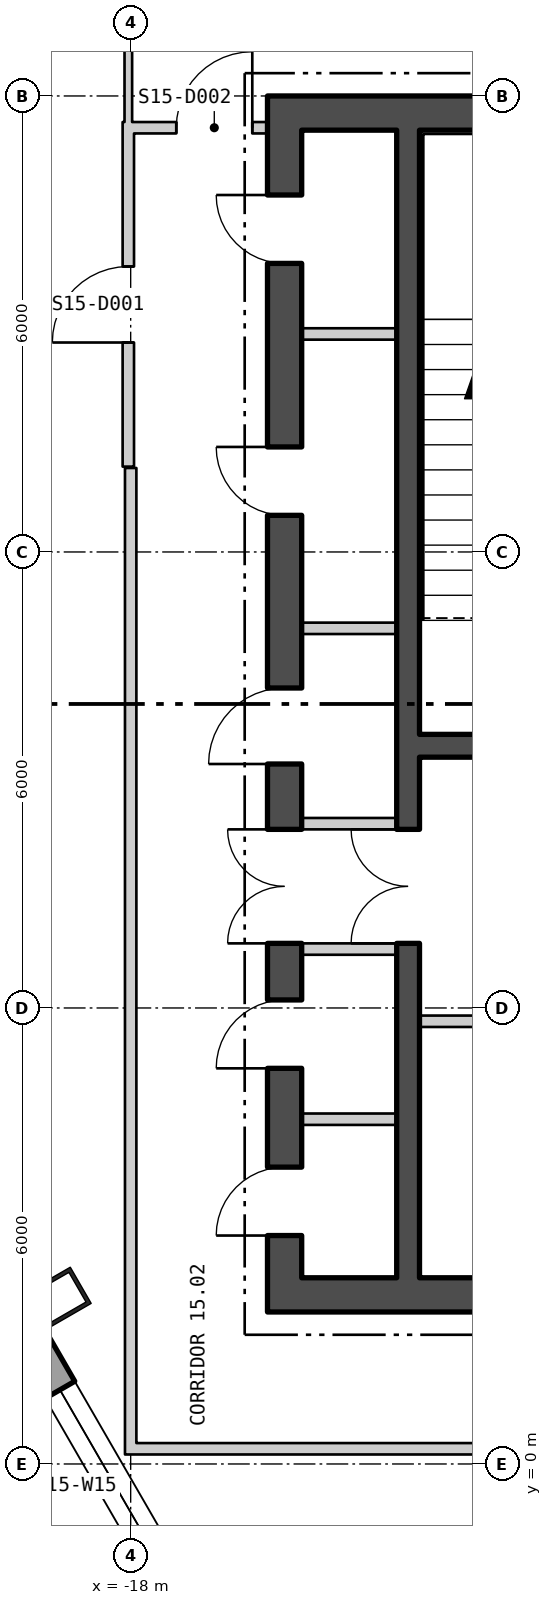
"""IFC4 building model, lengths in metres.
Left out: names, types, materials, properties, quantities, classifications, styles, units other than length and angle.
Written with IfcOpenShell. Run it as: python <this file> out.ifc"""

import sys

from ifc_helpers import new_model, si_unit, direction, frame, frame_2d, origin, origin_2d, place, context, subcontext, project, spatial, polyline, rectangle, hollow_rectangle, outline, extrude, element, fill, save


model = new_model("IFC4")
c1 = context("Model", 3, precision=1e-05, world=origin(), true_north=direction((0.0, 1.0)))
c2 = subcontext(c1, "Body", "Model", "MODEL_VIEW")
j1 = project(units=[si_unit("LENGTHUNIT", "METRE"), si_unit("PLANEANGLEUNIT", "RADIAN")], contexts=[c1])
p1 = place(None, origin())
s1 = spatial("IfcSite", under=j1, at=p1, CompositionType="ELEMENT")
p2 = place(p1, origin())
s2 = spatial("IfcBuilding", under=s1, at=p2, CompositionType="ELEMENT")
p3 = place(p2, frame((0.0, 0.0, 204.3)))
s3 = spatial("IfcBuildingStorey", under=s2, at=p3, CompositionType="ELEMENT", Elevation=204.3)
p4 = place(p3, frame((-18.96, 2.176, 0.0), z_axis=(0.0, 0.0, 1.0), x_axis=(0.5, -0.866025403784, 0.0)))
e1 = element("IfcColumn", 1, at=p4, inside=s3, PredefinedType="COLUMN", context=c2, shape_type="SweptSolid", body=[
    extrude(hollow_rectangle(XDim=0.55, YDim=0.7, WallThickness=0.05, at=origin_2d()), origin(), (0.0, 0.0, 1.0), 3.9),
])
p5 = place(p3, frame((-26.385, 13.887, -0.18), z_axis=(0.0, 0.0, 1.0), x_axis=(0.499999764979, -0.866025539474, 0.0)))
e2 = element("IfcWall", 2, at=p5, inside=s3, PredefinedType="SOLIDWALL", context=c2, shape_type="SweptSolid", body=[
    extrude(outline(polyline([(-0.13, -0.225), (45.87, -0.225), (45.61, 0.225), (0.13, 0.225), (-0.13, -0.225)])), origin(), (0.0, 0.0, 1.0), 3.68),
])
p6 = place(p5, frame((1.424, 0.0, 1.08)))
e3 = element("IfcOpeningElement", 3, at=p6, cuts=e2, PredefinedType="OPENING", context=c2, shape_type="SweptSolid", body=[
    extrude(rectangle(XDim=2.4, YDim=2.0, at=frame_2d((1.2, 1.0))), frame((0.0, 0.235, 0.0), z_axis=(0.0, -1.0, 0.0), x_axis=(1.0, 0.0, 0.0)), (0.0, 0.0, 1.0), 0.47),
])
p7 = place(p5, frame((5.893, 0.0, 1.08)))
e4 = element("IfcOpeningElement", 4, at=p7, cuts=e2, PredefinedType="OPENING", context=c2, shape_type="SweptSolid", body=[
    extrude(rectangle(XDim=2.4, YDim=2.0, at=frame_2d((1.2, 1.0))), frame((0.0, 0.235, 0.0), z_axis=(0.0, -1.0, 0.0), x_axis=(1.0, 0.0, 0.0)), (0.0, 0.0, 1.0), 0.47),
])
p8 = place(p5, frame((10.401, 0.0, 1.08)))
e5 = element("IfcOpeningElement", 5, at=p8, cuts=e2, PredefinedType="OPENING", context=c2, shape_type="SweptSolid", body=[
    extrude(rectangle(XDim=2.4, YDim=2.0, at=frame_2d((1.2, 1.0))), frame((0.0, 0.235, 0.0), z_axis=(0.0, -1.0, 0.0), x_axis=(1.0, 0.0, 0.0)), (0.0, 0.0, 1.0), 0.47),
])
p9 = place(p5, frame((14.909, 0.0, 1.08)))
e6 = element("IfcOpeningElement", 6, at=p9, cuts=e2, PredefinedType="OPENING", context=c2, shape_type="SweptSolid", body=[
    extrude(rectangle(XDim=2.4, YDim=2.0, at=frame_2d((1.2, 1.0))), frame((0.0, 0.235, 0.0), z_axis=(0.0, -1.0, 0.0), x_axis=(1.0, 0.0, 0.0)), (0.0, 0.0, 1.0), 0.47),
])
p10 = place(p5, frame((19.416, 0.0, 1.08)))
e7 = element("IfcOpeningElement", 7, at=p10, cuts=e2, PredefinedType="OPENING", context=c2, shape_type="SweptSolid", body=[
    extrude(rectangle(XDim=2.4, YDim=2.0, at=frame_2d((1.2, 1.0))), frame((0.0, 0.235, 0.0), z_axis=(0.0, -1.0, 0.0), x_axis=(1.0, 0.0, 0.0)), (0.0, 0.0, 1.0), 0.47),
])
p11 = place(p5, frame((23.924, 0.0, 1.08)))
e8 = element("IfcOpeningElement", 8, at=p11, cuts=e2, PredefinedType="OPENING", context=c2, shape_type="SweptSolid", body=[
    extrude(rectangle(XDim=2.4, YDim=2.0, at=frame_2d((1.2, 1.0))), frame((0.0, 0.235, 0.0), z_axis=(0.0, -1.0, 0.0), x_axis=(1.0, 0.0, 0.0)), (0.0, 0.0, 1.0), 0.47),
])
p12 = place(p5, frame((28.431, 0.0, 1.08)))
e9 = element("IfcOpeningElement", 9, at=p12, cuts=e2, PredefinedType="OPENING", context=c2, shape_type="SweptSolid", body=[
    extrude(rectangle(XDim=2.4, YDim=2.0, at=frame_2d((1.2, 1.0))), frame((0.0, 0.235, 0.0), z_axis=(0.0, -1.0, 0.0), x_axis=(1.0, 0.0, 0.0)), (0.0, 0.0, 1.0), 0.47),
])
p13 = place(p5, frame((32.939, 0.0, 1.08)))
e10 = element("IfcOpeningElement", 10, at=p13, cuts=e2, PredefinedType="OPENING", context=c2, shape_type="SweptSolid", body=[
    extrude(rectangle(XDim=2.4, YDim=2.0, at=frame_2d((1.2, 1.0))), frame((0.0, 0.235, 0.0), z_axis=(0.0, -1.0, 0.0), x_axis=(1.0, 0.0, 0.0)), (0.0, 0.0, 1.0), 0.47),
])
p14 = place(p5, frame((41.916, 0.0, 1.08)))
e11 = element("IfcOpeningElement", 11, at=p14, cuts=e2, PredefinedType="OPENING", context=c2, shape_type="SweptSolid", body=[
    extrude(rectangle(XDim=2.4, YDim=2.0, at=frame_2d((1.2, 1.0))), frame((0.0, 0.235, 0.0), z_axis=(0.0, -1.0, 0.0), x_axis=(1.0, 0.0, 0.0)), (0.0, 0.0, 1.0), 0.47),
])
p15 = place(p3, frame((-16.2, 2.225, 0.0), z_axis=(0.0, 0.0, 1.0), x_axis=(1.0, 0.0, 0.0)))
e12 = element("IfcWall", 12, at=p15, inside=s3, PredefinedType="SHEAR", context=c2, shape_type="SweptSolid", body=[
    extrude(rectangle(XDim=32.4, YDim=0.45, at=frame_2d((16.2, 0.0))), origin(), (0.0, 0.0, 1.0), 3.7),
])
p16 = place(p15, frame((10.7, 0.0, 0.0)))
e13 = element("IfcOpeningElement", 13, at=p16, cuts=e12, PredefinedType="OPENING", context=c2, shape_type="SweptSolid", body=[
    extrude(rectangle(XDim=1.8, YDim=2.4, at=frame_2d((0.9, 1.2))), frame((0.0, 0.235, 0.0), z_axis=(0.0, -1.0, 0.0), x_axis=(1.0, 0.0, 0.0)), (0.0, 0.0, 1.0), 0.47),
])
p17 = place(p15, frame((20.7, 0.0, 0.0)))
e14 = element("IfcOpeningElement", 14, at=p17, cuts=e12, PredefinedType="OPENING", context=c2, shape_type="SweptSolid", body=[
    extrude(rectangle(XDim=1.8, YDim=2.4, at=frame_2d((0.9, 1.2))), frame((0.0, 0.235, 0.0), z_axis=(0.0, -1.0, 0.0), x_axis=(1.0, 0.0, 0.0)), (0.0, 0.0, 1.0), 0.47),
])
p18 = place(p3, frame((-16.2, 17.775, 0.0), z_axis=(0.0, 0.0, 1.0), x_axis=(1.0, 0.0, 0.0)))
e15 = element("IfcWall", 15, at=p18, inside=s3, PredefinedType="SHEAR", context=c2, shape_type="SweptSolid", body=[
    extrude(rectangle(XDim=32.4, YDim=0.45, at=frame_2d((16.2, 0.0))), origin(), (0.0, 0.0, 1.0), 3.7),
])
p19 = place(p3, frame((-15.975, 2.45, 0.0), z_axis=(0.0, 0.0, 1.0), x_axis=(0.0, 1.0, 0.0)))
e16 = element("IfcWall", 16, at=p19, inside=s3, PredefinedType="SHEAR", context=c2, shape_type="SweptSolid", body=[
    extrude(rectangle(XDim=15.1, YDim=0.45, at=frame_2d((7.55, 0.0))), origin(), (0.0, 0.0, 1.0), 3.7),
])
p20 = place(p19, frame((4.4, 0.0, 0.0)))
e17 = element("IfcOpeningElement", 17, at=p20, cuts=e16, PredefinedType="OPENING", context=c2, shape_type="SweptSolid", body=[
    extrude(rectangle(XDim=1.5, YDim=2.1, at=frame_2d((0.75, 1.05))), frame((0.0, 0.235, 0.0), z_axis=(0.0, -1.0, 0.0), x_axis=(1.0, 0.0, 0.0)), (0.0, 0.0, 1.0), 0.47),
])
p21 = place(p19, frame((0.556, 0.0, 0.0)))
e18 = element("IfcOpeningElement", 18, at=p21, cuts=e16, PredefinedType="OPENING", context=c2, shape_type="SweptSolid", body=[
    extrude(rectangle(XDim=0.9, YDim=2.1, at=frame_2d((0.45, 1.05))), frame((0.0, 0.235, 0.0), z_axis=(0.0, -1.0, 0.0), x_axis=(1.0, 0.0, 0.0)), (0.0, 0.0, 1.0), 0.47),
])
p22 = place(p19, frame((2.756, 0.0, 0.0)))
e19 = element("IfcOpeningElement", 19, at=p22, cuts=e16, PredefinedType="OPENING", context=c2, shape_type="SweptSolid", body=[
    extrude(rectangle(XDim=0.9, YDim=2.1, at=frame_2d((0.45, 1.05))), frame((0.0, 0.235, 0.0), z_axis=(0.0, -1.0, 0.0), x_axis=(1.0, 0.0, 0.0)), (0.0, 0.0, 1.0), 0.47),
])
p23 = place(p19, frame((6.76, 0.0, 0.0)))
e20 = element("IfcOpeningElement", 20, at=p23, cuts=e16, PredefinedType="OPENING", context=c2, shape_type="SweptSolid", body=[
    extrude(rectangle(XDim=1.0, YDim=2.1, at=frame_2d((0.5, 1.05))), frame((0.0, 0.235, 0.0), z_axis=(0.0, -1.0, 0.0), x_axis=(1.0, 0.0, 0.0)), (0.0, 0.0, 1.0), 0.47),
])
p24 = place(p19, frame((10.032, 0.0, 0.0)))
e21 = element("IfcOpeningElement", 21, at=p24, cuts=e16, PredefinedType="OPENING", context=c2, shape_type="SweptSolid", body=[
    extrude(rectangle(XDim=0.9, YDim=2.1, at=frame_2d((0.45, 1.05))), frame((0.0, 0.235, 0.0), z_axis=(0.0, -1.0, 0.0), x_axis=(1.0, 0.0, 0.0)), (0.0, 0.0, 1.0), 0.47),
])
p25 = place(p19, frame((13.347, 0.0, 0.0)))
e22 = element("IfcOpeningElement", 22, at=p25, cuts=e16, PredefinedType="OPENING", context=c2, shape_type="SweptSolid", body=[
    extrude(rectangle(XDim=0.9, YDim=2.1, at=frame_2d((0.45, 1.05))), frame((0.0, 0.235, 0.0), z_axis=(0.0, -1.0, 0.0), x_axis=(1.0, 0.0, 0.0)), (0.0, 0.0, 1.0), 0.47),
])
p26 = place(p3, frame((-14.35, 2.45, 0.0), z_axis=(0.0, 0.0, 1.0), x_axis=(0.0, 1.0, 0.0)))
e23 = element("IfcWall", 23, at=p26, inside=s3, PredefinedType="SHEAR", context=c2, shape_type="SweptSolid", body=[
    extrude(rectangle(XDim=15.1, YDim=0.3, at=frame_2d((7.55, 0.0))), origin(), (0.0, 0.0, 1.0), 3.7),
])
p27 = place(p26, frame((4.4, 0.0, 0.0)))
e24 = element("IfcOpeningElement", 24, at=p27, cuts=e23, PredefinedType="OPENING", context=c2, shape_type="SweptSolid", body=[
    extrude(rectangle(XDim=1.5, YDim=2.1, at=frame_2d((0.75, 1.05))), frame((0.0, 0.16, 0.0), z_axis=(0.0, -1.0, 0.0), x_axis=(1.0, 0.0, 0.0)), (0.0, 0.0, 1.0), 0.32),
])
p28 = place(p3, frame((-14.2, 9.45, 0.0), z_axis=(0.0, 0.0, 1.0), x_axis=(1.0, 0.0, 0.0)))
e25 = element("IfcWall", 25, at=p28, inside=s3, PredefinedType="SHEAR", context=c2, shape_type="SweptSolid", body=[
    extrude(rectangle(XDim=3.2, YDim=0.3, at=frame_2d((1.6, 0.0))), origin(), (0.0, 0.0, 1.0), 3.7),
])
p29 = place(p28, frame((1.0, 0.0, 0.0)))
e26 = element("IfcOpeningElement", 26, at=p29, cuts=e25, PredefinedType="OPENING", context=c2, shape_type="SweptSolid", body=[
    extrude(rectangle(XDim=1.2, YDim=2.1, at=frame_2d((0.6, 1.05))), frame((0.0, 0.16, 0.0), z_axis=(0.0, -1.0, 0.0), x_axis=(1.0, 0.0, 0.0)), (0.0, 0.0, 1.0), 0.32),
])
p30 = place(p3, frame((-14.2, 5.825, 0.0), z_axis=(0.0, 0.0, 1.0), x_axis=(1.0, 0.0, 0.0)))
e27 = element("IfcWall", 27, at=p30, inside=s3, PredefinedType="PARTITIONING", context=c2, shape_type="SweptSolid", body=[
    extrude(rectangle(XDim=3.2, YDim=0.15, at=frame_2d((1.6, 0.0))), origin(), (0.0, 0.0, 1.0), 3.7),
])
for number, where, z_axis, x_axis in (
    (28, (-15.75, 6.775, 0.0), (0.0, 0.0, 1.0), (1.0, 0.0, 0.0)),
    (29, (-15.75, 8.425, 0.0), (0.0, 0.0, 1.0), (1.0, 0.0, 0.0)),
    (30, (-15.75, 4.536, 0.0), (0.0, 0.0, 1.0), (1.0, 0.0, 0.0)),
    (31, (-15.75, 10.995, 0.0), (0.0, 0.0, 1.0), (1.0, 0.0, 0.0)),
    (32, (-15.75, 14.869, 0.0), (0.0, 0.0, 1.0), (1.0, 0.0, 0.0)),
):
    element("IfcWall", number, at=place(p3, frame(where, z_axis=z_axis, x_axis=x_axis)), inside=s3, PredefinedType="PARTITIONING", context=c2, shape_type="SweptSolid", body=[
        extrude(rectangle(XDim=1.25, YDim=0.15, at=frame_2d((0.625, 0.0))), origin(), (0.0, 0.0, 1.0), 3.7),
    ])
p31 = place(p3, frame((-18.031, 13.123, 0.0), z_axis=(0.0, 0.0, 1.0), x_axis=(0.0, 1.0, 0.0)))
e33 = element("IfcWall", 33, at=p31, inside=s3, PredefinedType="PARTITIONING", context=c2, shape_type="SweptSolid", body=[
    extrude(rectangle(XDim=4.534, YDim=0.15, at=frame_2d((2.267, 0.0))), origin(), (0.0, 0.0, 1.0), 3.7),
])
p32 = place(p31, frame((1.633, 0.0, 0.0)))
e34 = element("IfcOpeningElement", 34, at=p32, cuts=e33, PredefinedType="OPENING", context=c2, shape_type="SweptSolid", body=[
    extrude(rectangle(XDim=1.0, YDim=2.1, at=frame_2d((0.5, 1.05))), frame((0.0, 0.085, 0.0), z_axis=(0.0, -1.0, 0.0), x_axis=(1.0, 0.0, 0.0)), (0.0, 0.0, 1.0), 0.17),
])
p33 = place(p3, frame((-18.031, 17.657, 0.0), z_axis=(0.0, 0.0, 1.0), x_axis=(0.0, 1.0, 0.0)))
e35 = element("IfcWall", 35, at=p33, inside=s3, PredefinedType="PARTITIONING", context=c2, shape_type="SweptSolid", body=[
    extrude(rectangle(XDim=1.643, YDim=0.1, at=frame_2d((0.822, 0.0))), origin(), (0.0, 0.0, 1.0), 3.7),
])
p34 = place(p3, frame((-18.0, 0.125, 0.0), z_axis=(0.0, 0.0, 1.0), x_axis=(0.0, 1.0, 0.0)))
e36 = element("IfcWall", 36, at=p34, inside=s3, PredefinedType="PARTITIONING", context=c2, shape_type="SweptSolid", body=[
    extrude(rectangle(XDim=12.98, YDim=0.15, at=frame_2d((6.49, 0.0))), origin(), (0.0, 0.0, 1.0), 3.7),
])
p35 = place(p3, frame((-17.956, 17.582, 0.0), z_axis=(0.0, 0.0, 1.0), x_axis=(1.0, 0.0, 0.0)))
e37 = element("IfcWall", 37, at=p35, inside=s3, PredefinedType="PARTITIONING", context=c2, shape_type="SweptSolid", body=[
    extrude(rectangle(XDim=1.756, YDim=0.15, at=frame_2d((0.878, 0.0))), origin(), (0.0, 0.0, 1.0), 3.7),
])
p36 = place(p35, frame((0.556, 0.0, 0.0)))
e38 = element("IfcOpeningElement", 38, at=p36, cuts=e37, PredefinedType="OPENING", context=c2, shape_type="SweptSolid", body=[
    extrude(rectangle(XDim=1.0, YDim=2.1, at=frame_2d((0.5, 1.05))), frame((0.0, 0.085, 0.0), z_axis=(0.0, -1.0, 0.0), x_axis=(1.0, 0.0, 0.0)), (0.0, 0.0, 1.0), 0.17),
])
p37 = place(p3, frame((-17.925, 0.2, 0.0), z_axis=(0.0, 0.0, 1.0), x_axis=(1.0, 0.0, 0.0)))
e39 = element("IfcWall", 39, at=p37, inside=s3, PredefinedType="PARTITIONING", context=c2, shape_type="SweptSolid", body=[
    extrude(rectangle(XDim=11.03, YDim=0.15, at=frame_2d((5.515, 0.0))), origin(), (0.0, 0.0, 1.0), 3.7),
])
p38 = place(p9, origin())
e40 = element("IfcWindow", 40, at=p38, inside=s3, PartitioningType="SINGLE_PANEL", PredefinedType="WINDOW", context=c2, shape_type="SweptSolid", body=[
    extrude(rectangle(XDim=2.4, YDim=2.0, at=frame_2d((1.2, 1.0))), frame((0.0, 0.105, 0.0), z_axis=(0.0, -1.0, 0.0), x_axis=(1.0, 0.0, 0.0)), (0.0, 0.0, 1.0), 0.06),
])
fill(e6, e40)
p39 = place(p27, origin())
e41 = element("IfcDoor", 41, at=p39, inside=s3, OperationType="DOUBLE_DOOR_SINGLE_SWING", PredefinedType="DOOR", context=c2, shape_type="SweptSolid", body=[
    extrude(rectangle(XDim=1.5, YDim=2.1, at=frame_2d((0.75, 1.05))), frame((0.0, 0.025, 0.0), z_axis=(0.0, -1.0, 0.0), x_axis=(1.0, 0.0, 0.0)), (0.0, 0.0, 1.0), 0.05),
])
fill(e24, e41)
p40 = place(p20, origin())
e42 = element("IfcDoor", 42, at=p40, inside=s3, OperationType="DOUBLE_DOOR_SINGLE_SWING", PredefinedType="DOOR", context=c2, shape_type="SweptSolid", body=[
    extrude(rectangle(XDim=1.5, YDim=2.1, at=frame_2d((0.75, 1.05))), frame((0.0, 0.025, 0.0), z_axis=(0.0, -1.0, 0.0), x_axis=(1.0, 0.0, 0.0)), (0.0, 0.0, 1.0), 0.05),
])
fill(e17, e42)
p41 = place(p21, origin())
e43 = element("IfcDoor", 43, at=p41, inside=s3, OperationType="SINGLE_SWING_RIGHT", PredefinedType="DOOR", context=c2, shape_type="SweptSolid", body=[
    extrude(rectangle(XDim=0.9, YDim=2.1, at=frame_2d((0.45, 1.05))), frame((0.0, 0.025, 0.0), z_axis=(0.0, -1.0, 0.0), x_axis=(1.0, 0.0, 0.0)), (0.0, 0.0, 1.0), 0.05),
])
fill(e18, e43)
p42 = place(p22, origin())
e44 = element("IfcDoor", 44, at=p42, inside=s3, OperationType="SINGLE_SWING_RIGHT", PredefinedType="DOOR", context=c2, shape_type="SweptSolid", body=[
    extrude(rectangle(XDim=0.9, YDim=2.1, at=frame_2d((0.45, 1.05))), frame((0.0, 0.025, 0.0), z_axis=(0.0, -1.0, 0.0), x_axis=(1.0, 0.0, 0.0)), (0.0, 0.0, 1.0), 0.05),
])
fill(e19, e44)
p43 = place(p23, origin())
e45 = element("IfcDoor", 45, at=p43, inside=s3, OperationType="SINGLE_SWING_RIGHT", PredefinedType="DOOR", context=c2, shape_type="SweptSolid", body=[
    extrude(rectangle(XDim=1.0, YDim=2.1, at=frame_2d((0.5, 1.05))), frame((0.0, 0.025, 0.0), z_axis=(0.0, -1.0, 0.0), x_axis=(1.0, 0.0, 0.0)), (0.0, 0.0, 1.0), 0.05),
])
fill(e20, e45)
p44 = place(p24, origin())
e46 = element("IfcDoor", 46, at=p44, inside=s3, OperationType="SINGLE_SWING_LEFT", PredefinedType="DOOR", context=c2, shape_type="SweptSolid", body=[
    extrude(rectangle(XDim=0.9, YDim=2.1, at=frame_2d((0.45, 1.05))), frame((0.0, 0.025, 0.0), z_axis=(0.0, -1.0, 0.0), x_axis=(1.0, 0.0, 0.0)), (0.0, 0.0, 1.0), 0.05),
])
fill(e21, e46)
p45 = place(p25, origin())
e47 = element("IfcDoor", 47, at=p45, inside=s3, OperationType="SINGLE_SWING_LEFT", PredefinedType="DOOR", context=c2, shape_type="SweptSolid", body=[
    extrude(rectangle(XDim=0.9, YDim=2.1, at=frame_2d((0.45, 1.05))), frame((0.0, 0.025, 0.0), z_axis=(0.0, -1.0, 0.0), x_axis=(1.0, 0.0, 0.0)), (0.0, 0.0, 1.0), 0.05),
])
fill(e22, e47)
p46 = place(p32, origin())
e48 = element("IfcDoor", 48, at=p46, inside=s3, OperationType="SINGLE_SWING_RIGHT", PredefinedType="DOOR", context=c2, shape_type="SweptSolid", body=[
    extrude(rectangle(XDim=1.0, YDim=2.1, at=frame_2d((0.5, 1.05))), frame((0.0, 0.025, 0.0), z_axis=(0.0, -1.0, 0.0), x_axis=(1.0, 0.0, 0.0)), (0.0, 0.0, 1.0), 0.05),
])
fill(e34, e48)
p47 = place(p36, origin())
e49 = element("IfcDoor", 49, at=p47, inside=s3, OperationType="SINGLE_SWING_LEFT", PredefinedType="DOOR", context=c2, shape_type="SweptSolid", body=[
    extrude(rectangle(XDim=1.0, YDim=2.1, at=frame_2d((0.5, 1.05))), frame((0.0, 0.025, 0.0), z_axis=(0.0, -1.0, 0.0), x_axis=(1.0, 0.0, 0.0)), (0.0, 0.0, 1.0), 0.05),
])
fill(e38, e49)
save(model, sys.argv[1])
